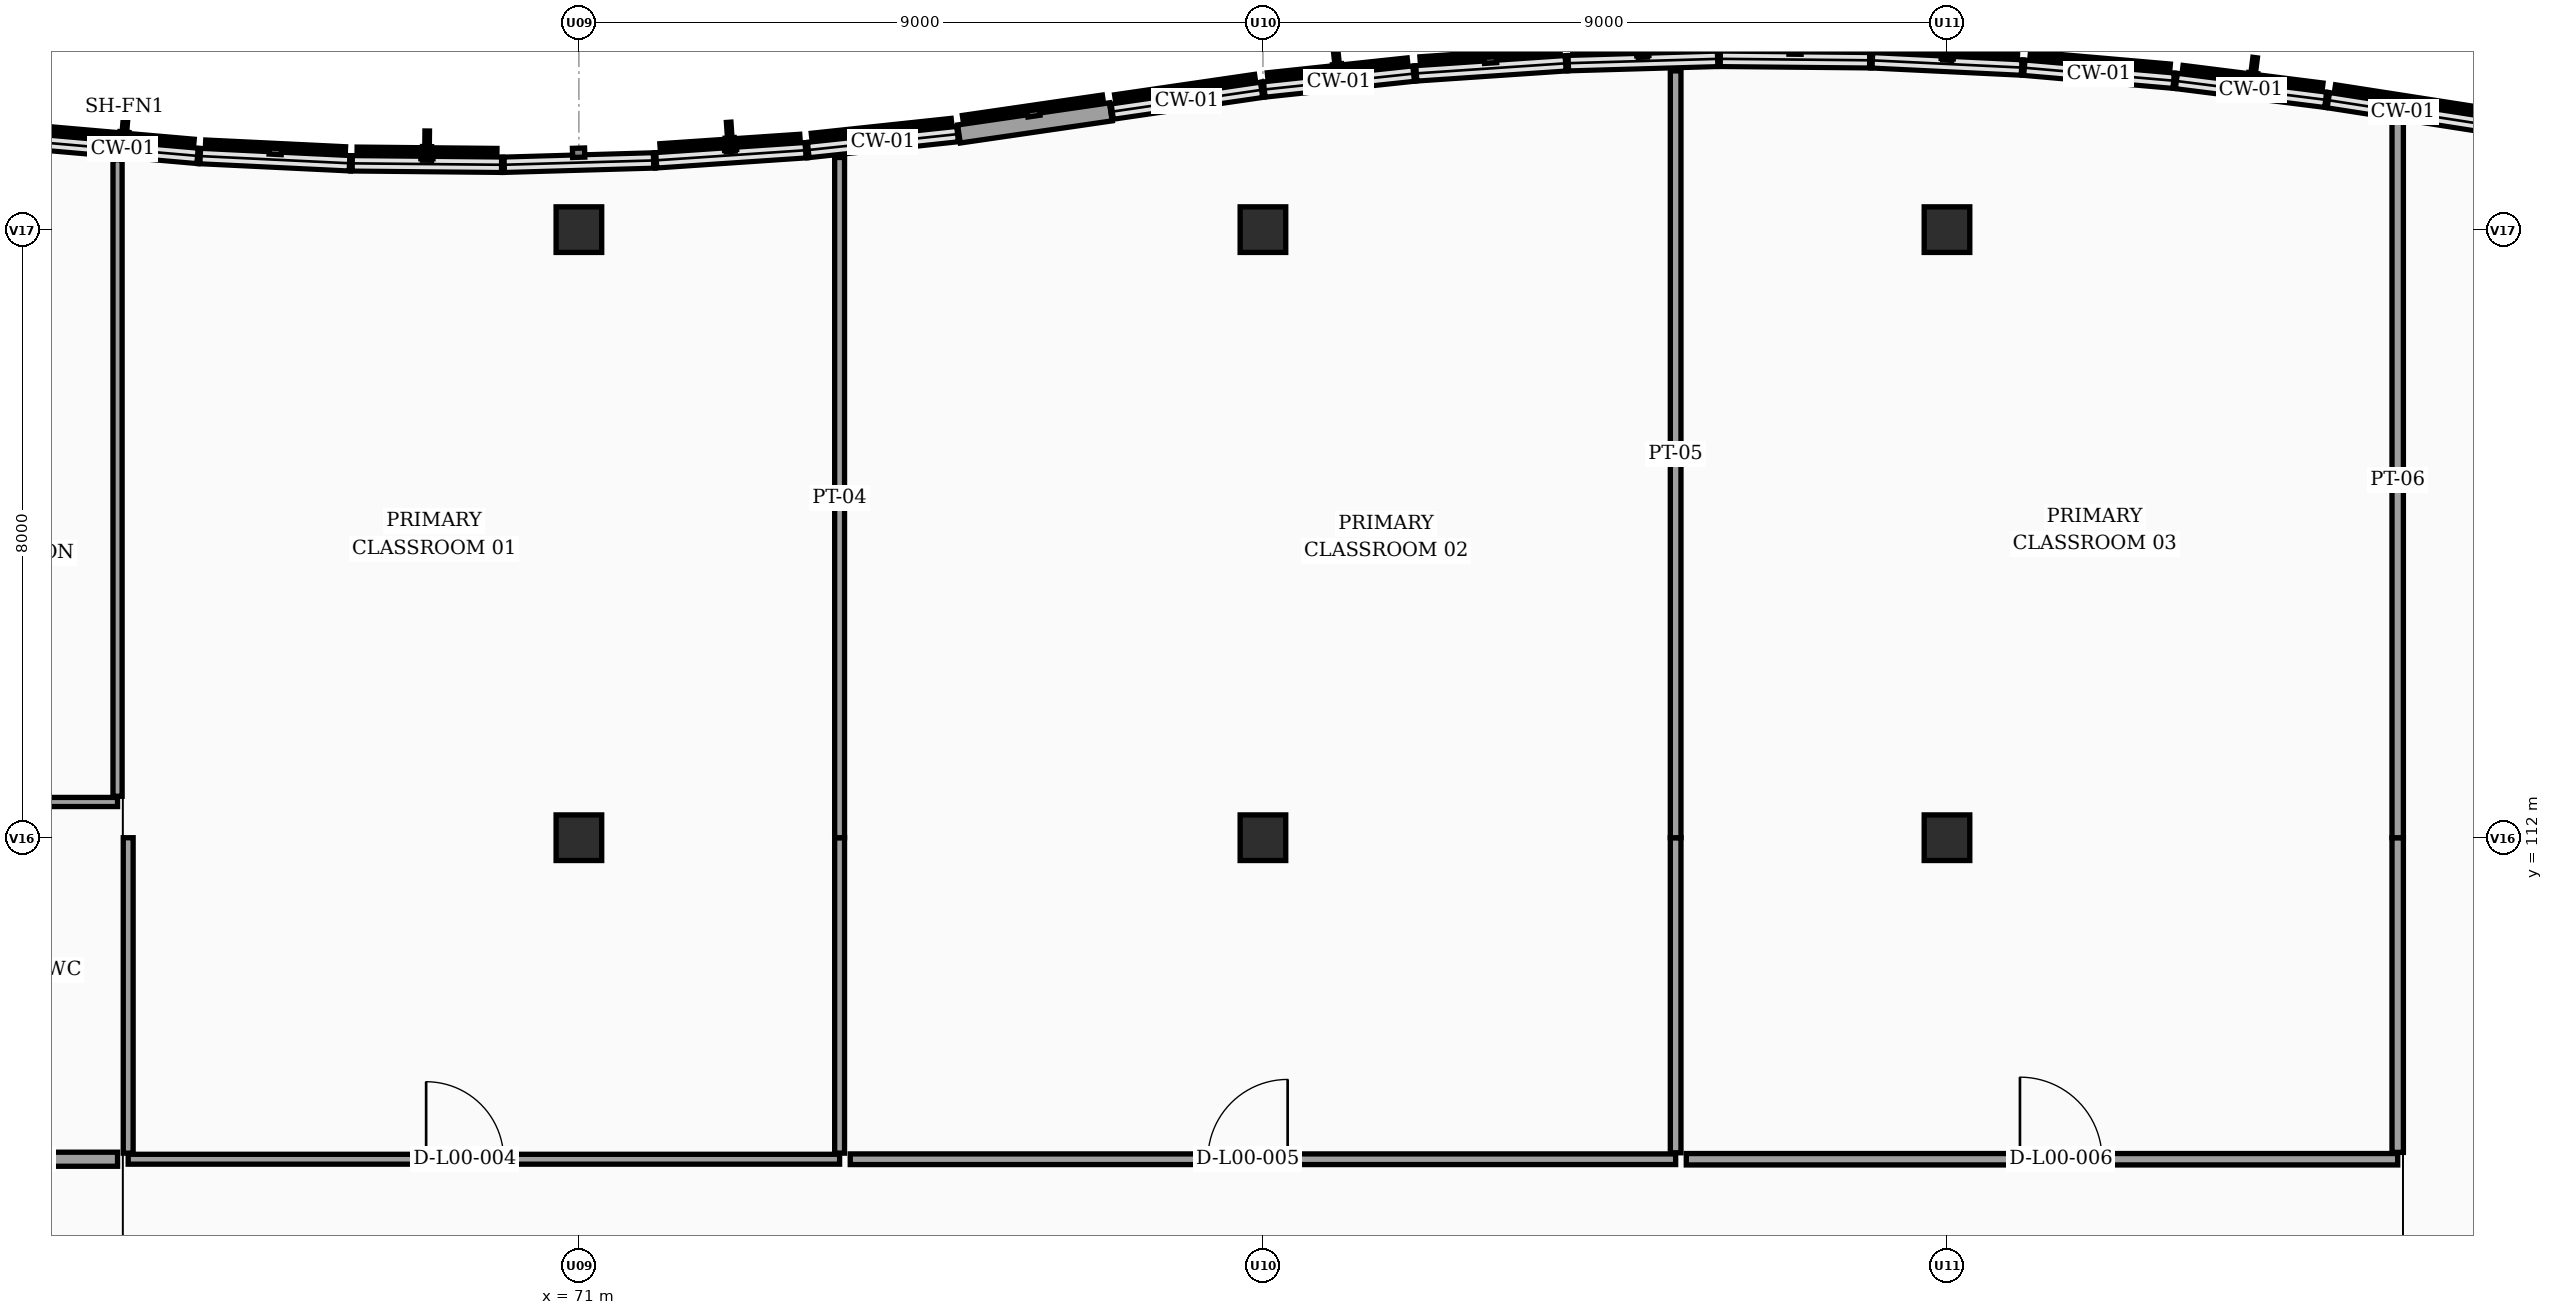
"""IFC4 building model, lengths in metres.
Left out: names, types, materials, properties, quantities, classifications, styles, units other than length and angle.
Written with IfcOpenShell. Run it as: python <this file> out.ifc"""

import sys

from ifc_helpers import new_model, si_unit, direction, frame, frame_2d, origin, origin_2d, place, context, subcontext, project, spatial, rectangle, extrude, element, fill, save


model = new_model("IFC4")
c1 = context("Model", 3, precision=1e-05, world=origin(), true_north=direction((0.0, 1.0)))
c2 = subcontext(c1, "Body", "Model", "MODEL_VIEW")
j1 = project(units=[si_unit("LENGTHUNIT", "METRE"), si_unit("PLANEANGLEUNIT", "RADIAN")], contexts=[c1])
p1 = place(None, origin())
s1 = spatial("IfcSite", under=j1, at=p1, CompositionType="ELEMENT")
p2 = place(p1, origin())
s2 = spatial("IfcBuilding", under=s1, at=p2, CompositionType="ELEMENT")
p3 = place(p2, origin())
s3 = spatial("IfcBuildingStorey", under=s2, at=p3, CompositionType="ELEMENT", Elevation=0.0)
for number, where, z_axis, x_axis in (
    (1, (71.0, 112.0, -0.2), (0.0, 0.0, 1.0), (1.0, 0.0, 0.0)),
    (2, (71.0, 120.0, -0.2), (0.0, 0.0, 1.0), (1.0, 0.0, 0.0)),
    (3, (80.0, 112.0, -0.2), (0.0, 0.0, 1.0), (1.0, 0.0, 0.0)),
    (4, (80.0, 120.0, -0.2), (0.0, 0.0, 1.0), (1.0, 0.0, 0.0)),
    (5, (89.0, 112.0, -0.2), (0.0, 0.0, 1.0), (1.0, 0.0, 0.0)),
    (6, (89.0, 120.0, -0.2), (0.0, 0.0, 1.0), (1.0, 0.0, 0.0)),
):
    element("IfcColumn", number, at=place(p3, frame(where, z_axis=z_axis, x_axis=x_axis)), inside=s3, PredefinedType="COLUMN", context=c2, shape_type="SweptSolid", body=[
        extrude(rectangle(XDim=0.6, YDim=0.6, at=origin_2d()), origin(), (0.0, 0.0, 1.0), 4.7),
    ])
p4 = place(p3, frame((64.0, 121.142, 0.0), z_axis=(0.0, 0.0, 1.0), x_axis=(0.996244237948, -0.086587633962, 0.0)))
e7 = element("IfcWall", 7, at=p4, inside=s3, PredefinedType="SOLIDWALL", context=c2, shape_type="SweptSolid", body=[
    extrude(rectangle(XDim=2.008, YDim=0.2, at=frame_2d((1.004, 0.0))), origin(), (0.0, 0.0, 1.0), 0.95),
])
p5 = place(p3, frame((66.0, 120.969, 0.0), z_axis=(0.0, 0.0, 1.0), x_axis=(0.99884540439, -0.048040172037, 0.0)))
e8 = element("IfcWall", 8, at=p5, inside=s3, PredefinedType="SOLIDWALL", context=c2, shape_type="SweptSolid", body=[
    extrude(rectangle(XDim=2.002, YDim=0.2, at=frame_2d((1.001, 0.0))), origin(), (0.0, 0.0, 1.0), 0.95),
])
p6 = place(p3, frame((68.0, 120.872, 0.0), z_axis=(0.0, 0.0, 1.0), x_axis=(0.999953504169, -0.009643106302, 0.0)))
e9 = element("IfcWall", 9, at=p6, inside=s3, PredefinedType="SOLIDWALL", context=c2, shape_type="SweptSolid", body=[
    extrude(rectangle(XDim=2.0, YDim=0.2, at=frame_2d((1.0, 0.0))), origin(), (0.0, 0.0, 1.0), 0.95),
])
p7 = place(p3, frame((70.0, 120.853, 0.0), z_axis=(0.0, 0.0, 1.0), x_axis=(0.999585290582, 0.028796646555, 0.0)))
e10 = element("IfcWall", 10, at=p7, inside=s3, PredefinedType="SOLIDWALL", context=c2, shape_type="SweptSolid", body=[
    extrude(rectangle(XDim=2.001, YDim=0.2, at=frame_2d((1.0, 0.0))), origin(), (0.0, 0.0, 1.0), 0.95),
])
p8 = place(p3, frame((72.0, 120.911, 0.0), z_axis=(0.0, 0.0, 1.0), x_axis=(0.997729302978, 0.067351599676, 0.0)))
e11 = element("IfcWall", 11, at=p8, inside=s3, PredefinedType="SOLIDWALL", context=c2, shape_type="SweptSolid", body=[
    extrude(rectangle(XDim=2.005, YDim=0.2, at=frame_2d((1.002, 0.0))), origin(), (0.0, 0.0, 1.0), 0.95),
])
p9 = place(p3, frame((74.0, 121.046, 0.0), z_axis=(0.0, 0.0, 1.0), x_axis=(0.994395160059, 0.105727317433, 0.0)))
e12 = element("IfcWall", 12, at=p9, inside=s3, PredefinedType="SOLIDWALL", context=c2, shape_type="SweptSolid", body=[
    extrude(rectangle(XDim=2.011, YDim=0.2, at=frame_2d((1.006, 0.0))), origin(), (0.0, 0.0, 1.0), 0.95),
])
p10 = place(p3, frame((76.0, 121.258, 0.0), z_axis=(0.0, 0.0, 1.0), x_axis=(0.989527230727, 0.144346318447, 0.0)))
e13 = element("IfcWall", 13, at=p10, inside=s3, PredefinedType="SOLIDWALL", context=c2, shape_type="SweptSolid", body=[
    extrude(rectangle(XDim=2.021, YDim=0.24, at=frame_2d((1.011, 0.0))), origin(), (0.0, 0.0, 1.0), 4.24),
])
p11 = place(p3, frame((78.0, 121.55, 0.0), z_axis=(0.0, 0.0, 1.0), x_axis=(0.989544477223, 0.144228040259, 0.0)))
e14 = element("IfcWall", 14, at=p11, inside=s3, PredefinedType="SOLIDWALL", context=c2, shape_type="SweptSolid", body=[
    extrude(rectangle(XDim=2.021, YDim=0.2, at=frame_2d((1.011, 0.0))), origin(), (0.0, 0.0, 1.0), 0.95),
])
p12 = place(p3, frame((80.0, 121.842, 0.0), z_axis=(0.0, 0.0, 1.0), x_axis=(0.994395160059, 0.105727317433, 0.0)))
e15 = element("IfcWall", 15, at=p12, inside=s3, PredefinedType="SOLIDWALL", context=c2, shape_type="SweptSolid", body=[
    extrude(rectangle(XDim=2.011, YDim=0.2, at=frame_2d((1.006, 0.0))), origin(), (0.0, 0.0, 1.0), 0.95),
])
p13 = place(p3, frame((82.0, 122.054, 0.0), z_axis=(0.0, 0.0, 1.0), x_axis=(0.997729302978, 0.067351599676, 0.0)))
e16 = element("IfcWall", 16, at=p13, inside=s3, PredefinedType="SOLIDWALL", context=c2, shape_type="SweptSolid", body=[
    extrude(rectangle(XDim=2.005, YDim=0.2, at=frame_2d((1.002, 0.0))), origin(), (0.0, 0.0, 1.0), 0.95),
])
p14 = place(p3, frame((84.0, 122.189, 0.0), z_axis=(0.0, 0.0, 1.0), x_axis=(0.999581770858, 0.028918564416, 0.0)))
e17 = element("IfcWall", 17, at=p14, inside=s3, PredefinedType="SOLIDWALL", context=c2, shape_type="SweptSolid", body=[
    extrude(rectangle(XDim=2.001, YDim=0.2, at=frame_2d((1.0, 0.0))), origin(), (0.0, 0.0, 1.0), 0.95),
])
p15 = place(p3, frame((86.0, 122.247, 0.0), z_axis=(0.0, 0.0, 1.0), x_axis=(0.999953504169, -0.009643106302, 0.0)))
e18 = element("IfcWall", 18, at=p15, inside=s3, PredefinedType="SOLIDWALL", context=c2, shape_type="SweptSolid", body=[
    extrude(rectangle(XDim=2.0, YDim=0.2, at=frame_2d((1.0, 0.0))), origin(), (0.0, 0.0, 1.0), 0.95),
])
p16 = place(p3, frame((88.0, 122.228, 0.0), z_axis=(0.0, 0.0, 1.0), x_axis=(0.99884540439, -0.048040172037, 0.0)))
e19 = element("IfcWall", 19, at=p16, inside=s3, PredefinedType="SOLIDWALL", context=c2, shape_type="SweptSolid", body=[
    extrude(rectangle(XDim=2.002, YDim=0.2, at=frame_2d((1.001, 0.0))), origin(), (0.0, 0.0, 1.0), 0.95),
])
p17 = place(p3, frame((90.0, 122.132, 0.0), z_axis=(0.0, 0.0, 1.0), x_axis=(0.996244237948, -0.086587633962, 0.0)))
e20 = element("IfcWall", 20, at=p17, inside=s3, PredefinedType="SOLIDWALL", context=c2, shape_type="SweptSolid", body=[
    extrude(rectangle(XDim=2.008, YDim=0.2, at=frame_2d((1.004, 0.0))), origin(), (0.0, 0.0, 1.0), 0.95),
])
p18 = place(p3, frame((92.0, 121.958, 0.0), z_axis=(0.0, 0.0, 1.0), x_axis=(0.992158168336, -0.124988675503, 0.0)))
e21 = element("IfcWall", 21, at=p18, inside=s3, PredefinedType="SOLIDWALL", context=c2, shape_type="SweptSolid", body=[
    extrude(rectangle(XDim=2.016, YDim=0.2, at=frame_2d((1.008, 0.0))), origin(), (0.0, 0.0, 1.0), 0.95),
])
p19 = place(p3, frame((94.0, 121.706, 0.0), z_axis=(0.0, 0.0, 1.0), x_axis=(0.988085509852, -0.153905897287, 0.0)))
e22 = element("IfcWall", 22, at=p19, inside=s3, PredefinedType="SOLIDWALL", context=c2, shape_type="SweptSolid", body=[
    extrude(rectangle(XDim=2.024, YDim=0.2, at=frame_2d((1.012, 0.0))), origin(), (0.0, 0.0, 1.0), 0.95),
])
p20 = place(p3, frame((62.0, 112.47, 0.0), z_axis=(0.0, 0.0, 1.0), x_axis=(1.0, 0.0, 0.0)))
e23 = element("IfcWall", 23, at=p20, inside=s3, PredefinedType="PARTITIONING", context=c2, shape_type="SweptSolid", body=[
    extrude(rectangle(XDim=2.93, YDim=0.12, at=frame_2d((1.465, 0.0))), origin(), (0.0, 0.0, 1.0), 4.24),
])
p21 = place(p3, frame((64.93, 112.545, 0.0), z_axis=(0.0, 0.0, 1.0), x_axis=(0.0, 1.0, 0.0)))
e24 = element("IfcWall", 24, at=p21, inside=s3, PredefinedType="PARTITIONING", context=c2, shape_type="SweptSolid", body=[
    extrude(rectangle(XDim=8.375, YDim=0.12, at=frame_2d((4.187, 0.0))), origin(), (0.0, 0.0, 1.0), 4.24),
])
p22 = place(p3, frame((65.07, 107.77, 0.0), z_axis=(0.0, 0.0, 1.0), x_axis=(1.0, 0.0, 0.0)))
e25 = element("IfcWall", 25, at=p22, inside=s3, PredefinedType="PARTITIONING", context=c2, shape_type="SweptSolid", body=[
    extrude(rectangle(XDim=9.36, YDim=0.13, at=frame_2d((4.68, 0.0))), origin(), (0.0, 0.0, 1.0), 4.24),
])
p23 = place(p22, frame((3.92, 0.0, 0.0)))
e26 = element("IfcOpeningElement", 26, at=p23, cuts=e25, PredefinedType="OPENING", context=c2, shape_type="SweptSolid", body=[
    extrude(rectangle(XDim=1.02, YDim=2.1, at=frame_2d((0.51, 1.05))), frame((0.0, 0.075, 0.0), z_axis=(0.0, -1.0, 0.0), x_axis=(1.0, 0.0, 0.0)), (0.0, 0.0, 1.0), 0.15),
])
for number, where, z_axis, x_axis in (
    (27, (65.07, 107.85, 0.0), (0.0, 0.0, 1.0), (0.0, 1.0, 0.0)),
    (28, (74.43, 107.85, 0.0), (0.0, 0.0, 1.0), (0.0, 1.0, 0.0)),
):
    element("IfcWall", number, at=place(p3, frame(where, z_axis=z_axis, x_axis=x_axis)), inside=s3, PredefinedType="PARTITIONING", context=c2, shape_type="SweptSolid", body=[
        extrude(rectangle(XDim=4.15, YDim=0.13, at=frame_2d((2.075, 0.0))), origin(), (0.0, 0.0, 1.0), 4.24),
    ])
p24 = place(p3, frame((74.43, 112.0, 0.0), z_axis=(0.0, 0.0, 1.0), x_axis=(0.0, 1.0, 0.0)))
e29 = element("IfcWall", 29, at=p24, inside=s3, PredefinedType="PARTITIONING", context=c2, shape_type="SweptSolid", body=[
    extrude(rectangle(XDim=8.949, YDim=0.13, at=frame_2d((4.475, 0.0))), origin(), (0.0, 0.0, 1.0), 4.24),
])
p25 = place(p3, frame((74.57, 107.77, 0.0), z_axis=(0.0, 0.0, 1.0), x_axis=(1.0, 0.0, 0.0)))
e30 = element("IfcWall", 30, at=p25, inside=s3, PredefinedType="PARTITIONING", context=c2, shape_type="SweptSolid", body=[
    extrude(rectangle(XDim=10.86, YDim=0.14, at=frame_2d((5.43, 0.0))), origin(), (0.0, 0.0, 1.0), 4.24),
])
p26 = place(p25, frame((4.705, 0.0, 0.0)))
e31 = element("IfcOpeningElement", 31, at=p26, cuts=e30, PredefinedType="OPENING", context=c2, shape_type="SweptSolid", body=[
    extrude(rectangle(XDim=1.05, YDim=2.1, at=frame_2d((0.525, 1.05))), frame((0.0, 0.08, 0.0), z_axis=(0.0, -1.0, 0.0), x_axis=(1.0, 0.0, 0.0)), (0.0, 0.0, 1.0), 0.16),
])
p27 = place(p3, frame((85.43, 107.855, 0.0), z_axis=(0.0, 0.0, 1.0), x_axis=(0.0, 1.0, 0.0)))
e32 = element("IfcWall", 32, at=p27, inside=s3, PredefinedType="PARTITIONING", context=c2, shape_type="SweptSolid", body=[
    extrude(rectangle(XDim=4.145, YDim=0.14, at=frame_2d((2.073, 0.0))), origin(), (0.0, 0.0, 1.0), 4.24),
])
p28 = place(p3, frame((85.43, 112.0, 0.0), z_axis=(0.0, 0.0, 1.0), x_axis=(0.0, 1.0, 0.0)))
e33 = element("IfcWall", 33, at=p28, inside=s3, PredefinedType="PARTITIONING", context=c2, shape_type="SweptSolid", body=[
    extrude(rectangle(XDim=10.089, YDim=0.14, at=frame_2d((5.044, 0.0))), origin(), (0.0, 0.0, 1.0), 4.24),
])
p29 = place(p3, frame((85.57, 107.77, 0.0), z_axis=(0.0, 0.0, 1.0), x_axis=(1.0, 0.0, 0.0)))
e34 = element("IfcWall", 34, at=p29, inside=s3, PredefinedType="PARTITIONING", context=c2, shape_type="SweptSolid", body=[
    extrude(rectangle(XDim=9.36, YDim=0.15, at=frame_2d((4.68, 0.0))), origin(), (0.0, 0.0, 1.0), 4.24),
])
p30 = place(p29, frame((4.39, 0.0, 0.0)))
e35 = element("IfcOpeningElement", 35, at=p30, cuts=e34, PredefinedType="OPENING", context=c2, shape_type="SweptSolid", body=[
    extrude(rectangle(XDim=1.08, YDim=2.15, at=frame_2d((0.54, 1.075))), frame((0.0, 0.085, 0.0), z_axis=(0.0, -1.0, 0.0), x_axis=(1.0, 0.0, 0.0)), (0.0, 0.0, 1.0), 0.17),
])
p31 = place(p3, frame((94.93, 107.86, 0.0), z_axis=(0.0, 0.0, 1.0), x_axis=(0.0, 1.0, 0.0)))
e36 = element("IfcWall", 36, at=p31, inside=s3, PredefinedType="PARTITIONING", context=c2, shape_type="SweptSolid", body=[
    extrude(rectangle(XDim=4.14, YDim=0.15, at=frame_2d((2.07, 0.0))), origin(), (0.0, 0.0, 1.0), 3.84),
])
p32 = place(p3, frame((94.93, 112.0, 0.0), z_axis=(0.0, 0.0, 1.0), x_axis=(0.0, 1.0, 0.0)))
e37 = element("IfcWall", 37, at=p32, inside=s3, PredefinedType="PARTITIONING", context=c2, shape_type="SweptSolid", body=[
    extrude(rectangle(XDim=9.419, YDim=0.15, at=frame_2d((4.709, 0.0))), origin(), (0.0, 0.0, 1.0), 3.84),
])
p33 = place(p3, frame((61.87, 107.77, 0.0), z_axis=(0.0, 0.0, 1.0), x_axis=(1.0, 0.0, 0.0)))
e38 = element("IfcWall", 38, at=p33, inside=s3, PredefinedType="PARTITIONING", context=c2, shape_type="SweptSolid", body=[
    extrude(rectangle(XDim=3.06, YDim=0.185, at=frame_2d((1.53, 0.0))), origin(), (0.0, 0.0, 1.0), 4.24),
])
p34 = place(p33, frame((0.95, 0.0, 0.0)))
e39 = element("IfcOpeningElement", 39, at=p34, cuts=e38, PredefinedType="OPENING", context=c2, shape_type="SweptSolid", body=[
    extrude(rectangle(XDim=1.16, YDim=2.15, at=frame_2d((0.58, 1.075))), frame((0.0, 0.103, 0.0), z_axis=(0.0, -1.0, 0.0), x_axis=(1.0, 0.0, 0.0)), (0.0, 0.0, 1.0), 0.205),
])
p35 = place(p23, origin())
e40 = element("IfcDoor", 40, at=p35, inside=s3, OperationType="SINGLE_SWING_LEFT", PredefinedType="DOOR", context=c2, shape_type="SweptSolid", body=[
    extrude(rectangle(XDim=1.02, YDim=2.1, at=frame_2d((0.51, 1.05))), frame((0.0, 0.025, 0.0), z_axis=(0.0, -1.0, 0.0), x_axis=(1.0, 0.0, 0.0)), (0.0, 0.0, 1.0), 0.05),
])
fill(e26, e40)
p36 = place(p26, origin())
e41 = element("IfcDoor", 41, at=p36, inside=s3, OperationType="SINGLE_SWING_RIGHT", PredefinedType="DOOR", context=c2, shape_type="SweptSolid", body=[
    extrude(rectangle(XDim=1.05, YDim=2.1, at=frame_2d((0.525, 1.05))), frame((0.0, 0.025, 0.0), z_axis=(0.0, -1.0, 0.0), x_axis=(1.0, 0.0, 0.0)), (0.0, 0.0, 1.0), 0.05),
])
fill(e31, e41)
p37 = place(p30, origin())
e42 = element("IfcDoor", 42, at=p37, inside=s3, OperationType="SINGLE_SWING_LEFT", PredefinedType="DOOR", context=c2, shape_type="SweptSolid", body=[
    extrude(rectangle(XDim=1.08, YDim=2.15, at=frame_2d((0.54, 1.075))), frame((0.0, 0.025, 0.0), z_axis=(0.0, -1.0, 0.0), x_axis=(1.0, 0.0, 0.0)), (0.0, 0.0, 1.0), 0.05),
])
fill(e35, e42)
save(model, sys.argv[1])
